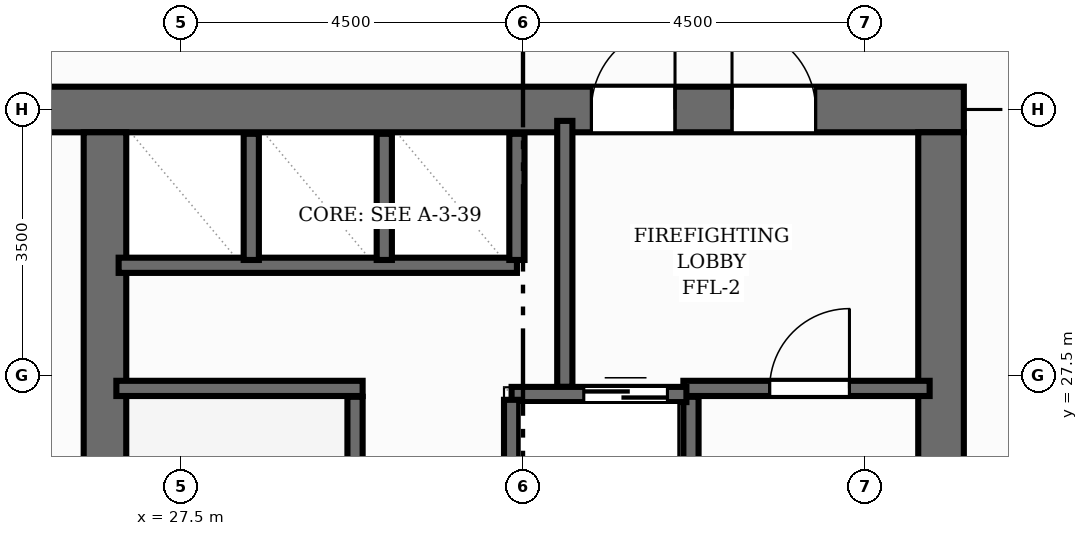
"""IFC4 building model, lengths in metres.
Left out: names, types, materials, properties, quantities, classifications, styles, units other than length and angle.
Written with IfcOpenShell. Run it as: python <this file> out.ifc"""

import sys

from ifc_helpers import new_model, si_unit, direction, frame, frame_2d, origin, place, context, subcontext, project, spatial, rectangle, extrude, element, fill, save


model = new_model("IFC4")
c1 = context("Model", 3, precision=1e-05, world=origin(), true_north=direction((0.0, 1.0)))
c2 = subcontext(c1, "Body", "Model", "MODEL_VIEW")
j1 = project(units=[si_unit("LENGTHUNIT", "METRE"), si_unit("PLANEANGLEUNIT", "RADIAN")], contexts=[c1])
p1 = place(None, origin())
s1 = spatial("IfcSite", under=j1, at=p1, CompositionType="ELEMENT")
p2 = place(p1, origin())
s2 = spatial("IfcBuilding", under=s1, at=p2, CompositionType="ELEMENT")
p3 = place(p2, frame((0.0, 0.0, 158.56)))
s3 = spatial("IfcBuildingStorey", under=s2, at=p3, CompositionType="ELEMENT", Elevation=158.56)
p4 = place(p3, frame((22.7, 31.0, 0.0), z_axis=(0.0, 0.0, 1.0), x_axis=(1.0, 0.0, 0.0)))
e1 = element("IfcWall", 1, at=p4, inside=s3, PredefinedType="SHEAR", context=c2, shape_type="SweptSolid", body=[
    extrude(rectangle(XDim=15.1, YDim=0.6, at=frame_2d((7.55, 0.0))), origin(), (0.0, 0.0, 1.0), 4.48),
])
p5 = place(p4, frame((10.2, 0.0, 0.0)))
e2 = element("IfcOpeningElement", 2, at=p5, cuts=e1, PredefinedType="OPENING", context=c2, shape_type="SweptSolid", body=[
    extrude(rectangle(XDim=1.1, YDim=2.15, at=frame_2d((0.55, 1.075))), frame((0.0, 0.31, 0.0), z_axis=(0.0, -1.0, 0.0), x_axis=(1.0, 0.0, 0.0)), (0.0, 0.0, 1.0), 0.62),
])
p6 = place(p4, frame((12.05, 0.0, 0.0)))
e3 = element("IfcOpeningElement", 3, at=p6, cuts=e1, PredefinedType="OPENING", context=c2, shape_type="SweptSolid", body=[
    extrude(rectangle(XDim=1.1, YDim=2.15, at=frame_2d((0.55, 1.075))), frame((0.0, 0.31, 0.0), z_axis=(0.0, -1.0, 0.0), x_axis=(1.0, 0.0, 0.0)), (0.0, 0.0, 1.0), 0.62),
])
p7 = place(p3, frame((37.5, 17.3, 0.0), z_axis=(0.0, 0.0, 1.0), x_axis=(0.0, 1.0, 0.0)))
e4 = element("IfcWall", 4, at=p7, inside=s3, PredefinedType="SHEAR", context=c2, shape_type="SweptSolid", body=[
    extrude(rectangle(XDim=13.4, YDim=0.6, at=frame_2d((6.7, 0.0))), origin(), (0.0, 0.0, 1.0), 4.48),
])
p8 = place(p3, frame((26.5, 17.3, 0.0), z_axis=(0.0, 0.0, 1.0), x_axis=(0.0, 1.0, 0.0)))
e5 = element("IfcWall", 5, at=p8, inside=s3, PredefinedType="SHEAR", context=c2, shape_type="SweptSolid", body=[
    extrude(rectangle(XDim=13.4, YDim=0.56, at=frame_2d((6.7, 0.0))), origin(), (0.0, 0.0, 1.0), 4.48),
])
p9 = place(p3, frame((29.79, 20.78, 0.0), z_axis=(0.0, 0.0, 1.0), x_axis=(0.0, 1.0, 0.0)))
e6 = element("IfcWall", 6, at=p9, inside=s3, PredefinedType="SHEAR", context=c2, shape_type="SweptSolid", body=[
    extrude(rectangle(XDim=6.44, YDim=0.2, at=frame_2d((3.22, 0.0))), origin(), (0.0, 0.0, 1.0), 4.48),
])
p10 = place(p3, frame((26.65, 27.33, 0.0), z_axis=(0.0, 0.0, 1.0), x_axis=(1.0, 0.0, 0.0)))
e7 = element("IfcWall", 7, at=p10, inside=s3, PredefinedType="SHEAR", context=c2, shape_type="SweptSolid", body=[
    extrude(rectangle(XDim=3.24, YDim=0.2, at=frame_2d((1.62, 0.0))), origin(), (0.0, 0.0, 1.0), 4.48),
])
p11 = place(p3, frame((34.21, 20.78, 0.0), z_axis=(0.0, 0.0, 1.0), x_axis=(0.0, 1.0, 0.0)))
e8 = element("IfcWall", 8, at=p11, inside=s3, PredefinedType="SHEAR", context=c2, shape_type="SweptSolid", body=[
    extrude(rectangle(XDim=6.44, YDim=0.2, at=frame_2d((3.22, 0.0))), origin(), (0.0, 0.0, 1.0), 4.48),
])
p12 = place(p3, frame((34.11, 27.33, 0.0), z_axis=(0.0, 0.0, 1.0), x_axis=(1.0, 0.0, 0.0)))
e9 = element("IfcWall", 9, at=p12, inside=s3, PredefinedType="SHEAR", context=c2, shape_type="SweptSolid", body=[
    extrude(rectangle(XDim=3.24, YDim=0.2, at=frame_2d((1.62, 0.0))), origin(), (0.0, 0.0, 1.0), 4.48),
])
p13 = place(p12, frame((1.135, 0.0, 0.0)))
e10 = element("IfcOpeningElement", 10, at=p13, cuts=e9, PredefinedType="OPENING", context=c2, shape_type="SweptSolid", body=[
    extrude(rectangle(XDim=1.05, YDim=2.15, at=frame_2d((0.525, 1.075))), frame((0.0, 0.11, 0.0), z_axis=(0.0, -1.0, 0.0), x_axis=(1.0, 0.0, 0.0)), (0.0, 0.0, 1.0), 0.22),
])
p14 = place(p3, frame((32.55, 27.35, 0.0), z_axis=(0.0, 0.0, 1.0), x_axis=(0.0, 1.0, 0.0)))
e11 = element("IfcWall", 11, at=p14, inside=s3, PredefinedType="SHEAR", context=c2, shape_type="SweptSolid", body=[
    extrude(rectangle(XDim=3.5, YDim=0.2, at=frame_2d((1.75, 0.0))), origin(), (0.0, 0.0, 1.0), 4.48),
])
p15 = place(p3, frame((31.85, 27.25, 0.0), z_axis=(0.0, 0.0, 1.0), x_axis=(1.0, 0.0, 0.0)))
e12 = element("IfcWall", 12, at=p15, inside=s3, PredefinedType="SHEAR", context=c2, shape_type="SweptSolid", body=[
    extrude(rectangle(XDim=2.3, YDim=0.2, at=frame_2d((1.15, 0.0))), origin(), (0.0, 0.0, 1.0), 4.48),
])
p16 = place(p15, frame((0.95, 0.0, 0.0)))
e13 = element("IfcOpeningElement", 13, at=p16, cuts=e12, PredefinedType="OPENING", context=c2, shape_type="SweptSolid", body=[
    extrude(rectangle(XDim=1.1, YDim=2.15, at=frame_2d((0.55, 1.075))), frame((0.0, 0.11, 0.0), z_axis=(0.0, -1.0, 0.0), x_axis=(1.0, 0.0, 0.0)), (0.0, 0.0, 1.0), 0.22),
])
p17 = place(p3, frame((31.85, 25.47, 0.0), z_axis=(0.0, 0.0, 1.0), x_axis=(0.0, 1.0, 0.0)))
e14 = element("IfcWall", 14, at=p17, inside=s3, PredefinedType="SHEAR", context=c2, shape_type="SweptSolid", body=[
    extrude(rectangle(XDim=1.71, YDim=0.2, at=frame_2d((0.855, 0.0))), origin(), (0.0, 0.0, 1.0), 4.48),
])
p18 = place(p3, frame((26.68, 28.95, 0.0), z_axis=(0.0, 0.0, 1.0), x_axis=(1.0, 0.0, 0.0)))
e15 = element("IfcWall", 15, at=p18, inside=s3, PredefinedType="SHEAR", context=c2, shape_type="SweptSolid", body=[
    extrude(rectangle(XDim=5.24, YDim=0.2, at=frame_2d((2.62, 0.0))), origin(), (0.0, 0.0, 1.0), 4.48),
])
for number, where, z_axis, x_axis in (
    (16, (31.92, 29.02, 0.0), (0.0, 0.0, 1.0), (0.0, 1.0, 0.0)),
    (17, (28.425, 29.02, 0.0), (0.0, 0.0, 1.0), (0.0, 1.0, 0.0)),
    (18, (30.175, 29.02, 0.0), (0.0, 0.0, 1.0), (0.0, 1.0, 0.0)),
):
    element("IfcWall", number, at=place(p3, frame(where, z_axis=z_axis, x_axis=x_axis)), inside=s3, PredefinedType="SHEAR", context=c2, shape_type="SweptSolid", body=[
        extrude(rectangle(XDim=1.66, YDim=0.2, at=frame_2d((0.83, 0.0))), origin(), (0.0, 0.0, 1.0), 4.48),
    ])
p19 = place(p13, origin())
e19 = element("IfcDoor", 19, at=p19, inside=s3, OperationType="SINGLE_SWING_RIGHT", PredefinedType="DOOR", context=c2, shape_type="SweptSolid", body=[
    extrude(rectangle(XDim=1.05, YDim=2.15, at=frame_2d((0.525, 1.075))), frame((0.0, 0.025, 0.0), z_axis=(0.0, -1.0, 0.0), x_axis=(1.0, 0.0, 0.0)), (0.0, 0.0, 1.0), 0.05),
])
fill(e10, e19)
p20 = place(p5, origin())
e20 = element("IfcDoor", 20, at=p20, inside=s3, OperationType="SINGLE_SWING_RIGHT", PredefinedType="DOOR", context=c2, shape_type="SweptSolid", body=[
    extrude(rectangle(XDim=1.1, YDim=2.15, at=frame_2d((0.55, 1.075))), frame((0.0, 0.025, 0.0), z_axis=(0.0, -1.0, 0.0), x_axis=(1.0, 0.0, 0.0)), (0.0, 0.0, 1.0), 0.05),
])
fill(e2, e20)
p21 = place(p6, origin())
e21 = element("IfcDoor", 21, at=p21, inside=s3, OperationType="SINGLE_SWING_LEFT", PredefinedType="DOOR", context=c2, shape_type="SweptSolid", body=[
    extrude(rectangle(XDim=1.1, YDim=2.15, at=frame_2d((0.55, 1.075))), frame((0.0, 0.025, 0.0), z_axis=(0.0, -1.0, 0.0), x_axis=(1.0, 0.0, 0.0)), (0.0, 0.0, 1.0), 0.05),
])
fill(e3, e21)
p22 = place(p16, origin())
e22 = element("IfcDoor", 22, at=p22, inside=s3, OperationType="DOUBLE_DOOR_SLIDING", PredefinedType="DOOR", context=c2, shape_type="SweptSolid", body=[
    extrude(rectangle(XDim=1.1, YDim=2.15, at=frame_2d((0.55, 1.075))), frame((0.0, 0.025, 0.0), z_axis=(0.0, -1.0, 0.0), x_axis=(1.0, 0.0, 0.0)), (0.0, 0.0, 1.0), 0.05),
])
fill(e13, e22)
save(model, sys.argv[1])
